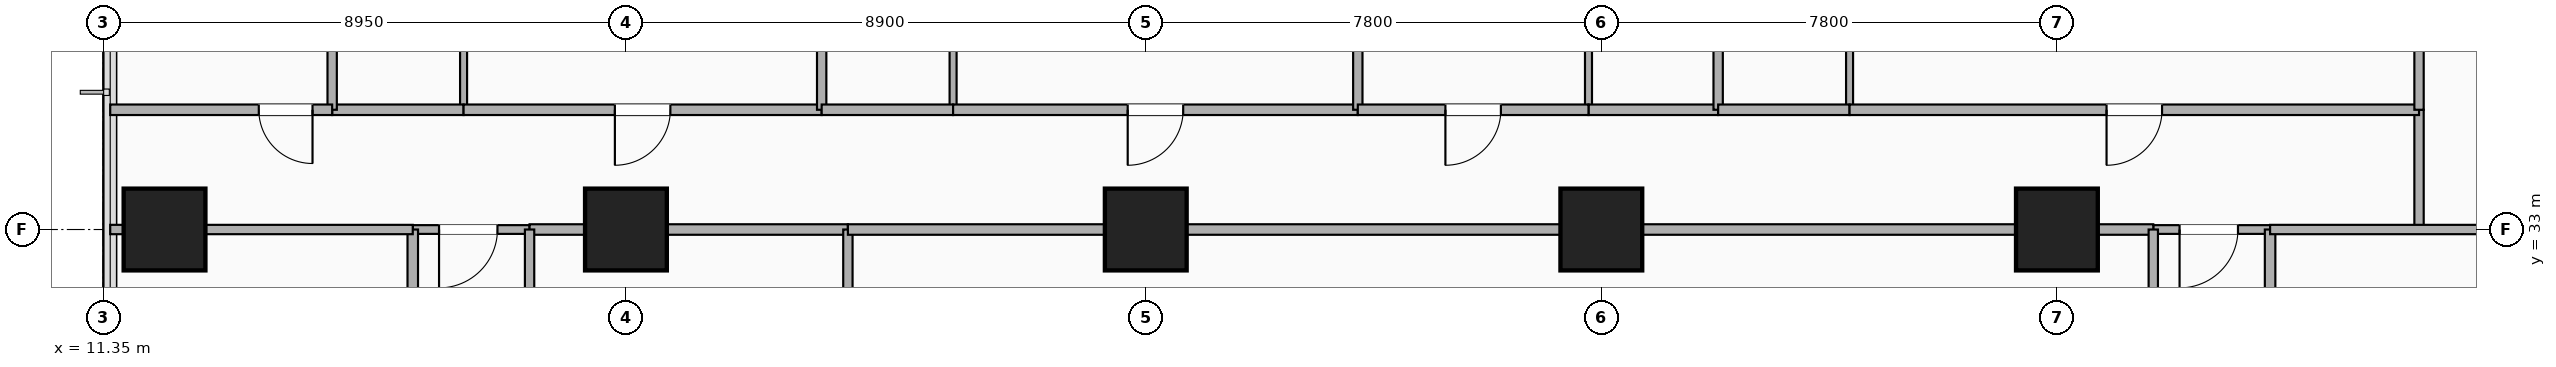
"""IFC4 building model, lengths in metres.
Left out: names, types, materials, properties, quantities, classifications, styles, units other than length and angle.
Written with IfcOpenShell. Run it as: python <this file> out.ifc"""

import sys

from ifc_helpers import new_model, si_unit, direction, frame, frame_2d, origin, origin_2d, place, context, subcontext, project, spatial, rectangle, extrude, element, fill, save


model = new_model("IFC4")
c1 = context("Model", 3, precision=1e-05, world=origin(), true_north=direction((0.0, 1.0)))
c2 = subcontext(c1, "Body", "Model", "MODEL_VIEW")
j1 = project(units=[si_unit("LENGTHUNIT", "METRE"), si_unit("PLANEANGLEUNIT", "RADIAN")], contexts=[c1])
p1 = place(None, origin())
s1 = spatial("IfcSite", under=j1, at=p1, CompositionType="ELEMENT")
p2 = place(p1, origin())
s2 = spatial("IfcBuilding", under=s1, at=p2, CompositionType="ELEMENT")
p3 = place(p2, frame((0.0, 0.0, 64.9)))
s3 = spatial("IfcBuildingStorey", under=s2, at=p3, CompositionType="ELEMENT", Elevation=64.9)
for number, where, z_axis, x_axis in (
    (1, (20.3, 33.0, -0.28), (0.0, 0.0, 1.0), (1.0, 0.0, 0.0)),
    (2, (29.2, 33.0, -0.28), (0.0, 0.0, 1.0), (1.0, 0.0, 0.0)),
    (3, (37.0, 33.0, -0.28), (0.0, 0.0, 1.0), (1.0, 0.0, 0.0)),
    (4, (44.8, 33.0, -0.28), (0.0, 0.0, 1.0), (1.0, 0.0, 0.0)),
    (5, (12.4, 33.0, -0.28), (0.0, 0.0, 1.0), (1.0, 0.0, 0.0)),
):
    element("IfcColumn", number, at=place(p3, frame(where, z_axis=z_axis, x_axis=x_axis)), inside=s3, PredefinedType="COLUMN", context=c2, shape_type="SweptSolid", body=[
        extrude(rectangle(XDim=1.4, YDim=1.4, at=origin_2d()), origin(), (0.0, 0.0, 1.0), 3.5),
    ])
p4 = place(p3, frame((16.65, 33.0, 0.0), z_axis=(0.0, 0.0, 1.0), x_axis=(1.0, 0.0, 0.0)))
e6 = element("IfcWall", 6, at=p4, inside=s3, PredefinedType="PARTITIONING", context=c2, shape_type="SweptSolid", body=[
    extrude(rectangle(XDim=2.0, YDim=0.15, at=frame_2d((1.0, 0.0))), origin(), (0.0, 0.0, 1.0), 2.51),
])
p5 = place(p4, frame((0.45, 0.0, 0.0)))
e7 = element("IfcOpeningElement", 7, at=p5, cuts=e6, PredefinedType="OPENING", context=c2, shape_type="SweptSolid", body=[
    extrude(rectangle(XDim=1.0, YDim=2.15, at=frame_2d((0.5, 1.075))), frame((0.0, 0.085, 0.0), z_axis=(0.0, -1.0, 0.0), x_axis=(1.0, 0.0, 0.0)), (0.0, 0.0, 1.0), 0.17),
])
p6 = place(p3, frame((46.45, 33.0, 0.0), z_axis=(0.0, 0.0, 1.0), x_axis=(1.0, 0.0, 0.0)))
e8 = element("IfcWall", 8, at=p6, inside=s3, PredefinedType="PARTITIONING", context=c2, shape_type="SweptSolid", body=[
    extrude(rectangle(XDim=2.0, YDim=0.15, at=frame_2d((1.0, 0.0))), origin(), (0.0, 0.0, 1.0), 2.51),
])
p7 = place(p6, frame((0.45, 0.0, 0.0)))
e9 = element("IfcOpeningElement", 9, at=p7, cuts=e8, PredefinedType="OPENING", context=c2, shape_type="SweptSolid", body=[
    extrude(rectangle(XDim=1.0, YDim=2.15, at=frame_2d((0.5, 1.075))), frame((0.0, 0.085, 0.0), z_axis=(0.0, -1.0, 0.0), x_axis=(1.0, 0.0, 0.0)), (0.0, 0.0, 1.0), 0.17),
])
p8 = place(p3, frame((51.0, 33.0, 0.0), z_axis=(0.0, 0.0, 1.0), x_axis=(0.0, 1.0, 0.0)))
e10 = element("IfcWall", 10, at=p8, inside=s3, PredefinedType="PARTITIONING", context=c2, shape_type="SweptSolid", body=[
    extrude(rectangle(XDim=2.05, YDim=0.16, at=frame_2d((1.025, 0.0))), origin(), (0.0, 0.0, 1.0), 2.51),
])
p9 = place(p3, frame((18.65, 33.0, 0.0), z_axis=(0.0, 0.0, 1.0), x_axis=(1.0, 0.0, 0.0)))
e11 = element("IfcWall", 11, at=p9, inside=s3, PredefinedType="PARTITIONING", context=c2, shape_type="SweptSolid", body=[
    extrude(rectangle(XDim=5.45, YDim=0.18, at=frame_2d((2.725, 0.0))), origin(), (0.0, 0.0, 1.0), 2.51),
])
for number, where, z_axis, x_axis in (
    (12, (18.65, 22.65, 0.0), (0.0, 0.0, 1.0), (0.0, 1.0, 0.0)),
    (13, (24.1, 22.65, 0.0), (0.0, 0.0, 1.0), (0.0, 1.0, 0.0)),
):
    element("IfcWall", number, at=place(p3, frame(where, z_axis=z_axis, x_axis=x_axis)), inside=s3, PredefinedType="PARTITIONING", context=c2, shape_type="SweptSolid", body=[
        extrude(rectangle(XDim=10.35, YDim=0.16, at=frame_2d((5.175, 0.0))), origin(), (0.0, 0.0, 1.0), 2.51),
    ])
p10 = place(p3, frame((24.1, 33.0, 0.0), z_axis=(0.0, 0.0, 1.0), x_axis=(1.0, 0.0, 0.0)))
e14 = element("IfcWall", 14, at=p10, inside=s3, PredefinedType="PARTITIONING", context=c2, shape_type="SweptSolid", body=[
    extrude(rectangle(XDim=22.35, YDim=0.18, at=frame_2d((11.175, 0.0))), origin(), (0.0, 0.0, 1.0), 2.51),
])
p11 = place(p3, frame((46.45, 22.65, 0.0), z_axis=(0.0, 0.0, 1.0), x_axis=(0.0, 1.0, 0.0)))
e15 = element("IfcWall", 15, at=p11, inside=s3, PredefinedType="PARTITIONING", context=c2, shape_type="SweptSolid", body=[
    extrude(rectangle(XDim=10.35, YDim=0.16, at=frame_2d((5.175, 0.0))), origin(), (0.0, 0.0, 1.0), 2.51),
])
p12 = place(p3, frame((17.52, 35.05, 0.0), z_axis=(0.0, 0.0, 1.0), x_axis=(0.0, 1.0, 0.0)))
e16 = element("IfcWall", 16, at=p12, inside=s3, PredefinedType="PARTITIONING", context=c2, shape_type="SweptSolid", body=[
    extrude(rectangle(XDim=2.35, YDim=0.12, at=frame_2d((1.175, 0.0))), origin(), (0.0, 0.0, 1.0), 3.22),
])
p13 = place(p3, frame((15.27, 35.05, 0.0), z_axis=(0.0, 0.0, 1.0), x_axis=(1.0, 0.0, 0.0)))
e17 = element("IfcWall", 17, at=p13, inside=s3, PredefinedType="PARTITIONING", context=c2, shape_type="SweptSolid", body=[
    extrude(rectangle(XDim=2.25, YDim=0.18, at=frame_2d((1.125, 0.0))), origin(), (0.0, 0.0, 1.0), 3.22),
])
p14 = place(p3, frame((17.52, 35.05, 0.0), z_axis=(0.0, 0.0, 1.0), x_axis=(1.0, 0.0, 0.0)))
e18 = element("IfcWall", 18, at=p14, inside=s3, PredefinedType="PARTITIONING", context=c2, shape_type="SweptSolid", body=[
    extrude(rectangle(XDim=6.131, YDim=0.18, at=frame_2d((3.065, 0.0))), origin(), (0.0, 0.0, 1.0), 2.51),
])
p15 = place(p14, frame((2.591, 0.0, 0.0)))
e19 = element("IfcOpeningElement", 19, at=p15, cuts=e18, PredefinedType="OPENING", context=c2, shape_type="SweptSolid", body=[
    extrude(rectangle(XDim=0.95, YDim=2.15, at=frame_2d((0.475, 1.075))), frame((0.0, 0.1, 0.0), z_axis=(0.0, -1.0, 0.0), x_axis=(1.0, 0.0, 0.0)), (0.0, 0.0, 1.0), 0.2),
])
p16 = place(p3, frame((15.27, 35.05, 0.0), z_axis=(0.0, 0.0, 1.0), x_axis=(0.0, 1.0, 0.0)))
e20 = element("IfcWall", 20, at=p16, inside=s3, PredefinedType="PARTITIONING", context=c2, shape_type="SweptSolid", body=[
    extrude(rectangle(XDim=9.53, YDim=0.16, at=frame_2d((4.765, 0.0))), origin(), (0.0, 0.0, 1.0), 3.22),
])
p17 = place(p3, frame((23.651, 35.05, 0.0), z_axis=(0.0, 0.0, 1.0), x_axis=(0.0, 1.0, 0.0)))
e21 = element("IfcWall", 21, at=p17, inside=s3, PredefinedType="PARTITIONING", context=c2, shape_type="SweptSolid", body=[
    extrude(rectangle(XDim=13.33, YDim=0.16, at=frame_2d((6.665, 0.0))), origin(), (0.0, 0.0, 1.0), 2.583),
])
p18 = place(p3, frame((25.901, 35.05, 0.0), z_axis=(0.0, 0.0, 1.0), x_axis=(0.0, 1.0, 0.0)))
e22 = element("IfcWall", 22, at=p18, inside=s3, PredefinedType="PARTITIONING", context=c2, shape_type="SweptSolid", body=[
    extrude(rectangle(XDim=2.35, YDim=0.12, at=frame_2d((1.175, 0.0))), origin(), (0.0, 0.0, 1.0), 2.902),
])
p19 = place(p3, frame((23.651, 35.05, 0.0), z_axis=(0.0, 0.0, 1.0), x_axis=(1.0, 0.0, 0.0)))
e23 = element("IfcWall", 23, at=p19, inside=s3, PredefinedType="PARTITIONING", context=c2, shape_type="SweptSolid", body=[
    extrude(rectangle(XDim=2.25, YDim=0.18, at=frame_2d((1.125, 0.0))), origin(), (0.0, 0.0, 1.0), 3.22),
])
p20 = place(p3, frame((25.901, 35.05, 0.0), z_axis=(0.0, 0.0, 1.0), x_axis=(1.0, 0.0, 0.0)))
e24 = element("IfcWall", 24, at=p20, inside=s3, PredefinedType="PARTITIONING", context=c2, shape_type="SweptSolid", body=[
    extrude(rectangle(XDim=6.929, YDim=0.18, at=frame_2d((3.465, 0.0))), origin(), (0.0, 0.0, 1.0), 2.51),
])
p21 = place(p20, frame((2.99, 0.0, 0.0)))
e25 = element("IfcOpeningElement", 25, at=p21, cuts=e24, PredefinedType="OPENING", context=c2, shape_type="SweptSolid", body=[
    extrude(rectangle(XDim=0.95, YDim=2.15, at=frame_2d((0.475, 1.075))), frame((0.0, 0.1, 0.0), z_axis=(0.0, -1.0, 0.0), x_axis=(1.0, 0.0, 0.0)), (0.0, 0.0, 1.0), 0.2),
])
p22 = place(p3, frame((32.83, 35.05, 0.0), z_axis=(0.0, 0.0, 1.0), x_axis=(0.0, 1.0, 0.0)))
e26 = element("IfcWall", 26, at=p22, inside=s3, PredefinedType="PARTITIONING", context=c2, shape_type="SweptSolid", body=[
    extrude(rectangle(XDim=13.33, YDim=0.16, at=frame_2d((6.665, 0.0))), origin(), (0.0, 0.0, 1.0), 2.583),
])
p23 = place(p3, frame((36.78, 35.05, 0.0), z_axis=(0.0, 0.0, 1.0), x_axis=(0.0, 1.0, 0.0)))
e27 = element("IfcWall", 27, at=p23, inside=s3, PredefinedType="PARTITIONING", context=c2, shape_type="SweptSolid", body=[
    extrude(rectangle(XDim=2.35, YDim=0.12, at=frame_2d((1.175, 0.0))), origin(), (0.0, 0.0, 1.0), 2.51),
])
p24 = place(p3, frame((36.78, 35.05, 0.0), z_axis=(0.0, 0.0, 1.0), x_axis=(1.0, 0.0, 0.0)))
e28 = element("IfcWall", 28, at=p24, inside=s3, PredefinedType="PARTITIONING", context=c2, shape_type="SweptSolid", body=[
    extrude(rectangle(XDim=2.22, YDim=0.18, at=frame_2d((1.11, 0.0))), origin(), (0.0, 0.0, 1.0), 2.51),
])
p25 = place(p3, frame((32.83, 35.05, 0.0), z_axis=(0.0, 0.0, 1.0), x_axis=(1.0, 0.0, 0.0)))
e29 = element("IfcWall", 29, at=p25, inside=s3, PredefinedType="PARTITIONING", context=c2, shape_type="SweptSolid", body=[
    extrude(rectangle(XDim=3.95, YDim=0.18, at=frame_2d((1.975, 0.0))), origin(), (0.0, 0.0, 1.0), 2.51),
])
p26 = place(p25, frame((1.5, 0.0, 0.0)))
e30 = element("IfcOpeningElement", 30, at=p26, cuts=e29, PredefinedType="OPENING", context=c2, shape_type="SweptSolid", body=[
    extrude(rectangle(XDim=0.95, YDim=2.15, at=frame_2d((0.475, 1.075))), frame((0.0, 0.1, 0.0), z_axis=(0.0, -1.0, 0.0), x_axis=(1.0, 0.0, 0.0)), (0.0, 0.0, 1.0), 0.2),
])
p27 = place(p3, frame((39.0, 35.05, 0.0), z_axis=(0.0, 0.0, 1.0), x_axis=(0.0, 1.0, 0.0)))
e31 = element("IfcWall", 31, at=p27, inside=s3, PredefinedType="PARTITIONING", context=c2, shape_type="SweptSolid", body=[
    extrude(rectangle(XDim=13.33, YDim=0.16, at=frame_2d((6.665, 0.0))), origin(), (0.0, 0.0, 1.0), 2.583),
])
p28 = place(p3, frame((41.25, 35.05, 0.0), z_axis=(0.0, 0.0, 1.0), x_axis=(0.0, 1.0, 0.0)))
e32 = element("IfcWall", 32, at=p28, inside=s3, PredefinedType="PARTITIONING", context=c2, shape_type="SweptSolid", body=[
    extrude(rectangle(XDim=2.35, YDim=0.12, at=frame_2d((1.175, 0.0))), origin(), (0.0, 0.0, 1.0), 2.902),
])
p29 = place(p3, frame((39.0, 35.05, 0.0), z_axis=(0.0, 0.0, 1.0), x_axis=(1.0, 0.0, 0.0)))
e33 = element("IfcWall", 33, at=p29, inside=s3, PredefinedType="PARTITIONING", context=c2, shape_type="SweptSolid", body=[
    extrude(rectangle(XDim=2.25, YDim=0.18, at=frame_2d((1.125, 0.0))), origin(), (0.0, 0.0, 1.0), 3.22),
])
p30 = place(p3, frame((41.25, 35.05, 0.0), z_axis=(0.0, 0.0, 1.0), x_axis=(1.0, 0.0, 0.0)))
e34 = element("IfcWall", 34, at=p30, inside=s3, PredefinedType="PARTITIONING", context=c2, shape_type="SweptSolid", body=[
    extrude(rectangle(XDim=9.75, YDim=0.18, at=frame_2d((4.875, 0.0))), origin(), (0.0, 0.0, 1.0), 2.51),
])
p31 = place(p30, frame((4.4, 0.0, 0.0)))
e35 = element("IfcOpeningElement", 35, at=p31, cuts=e34, PredefinedType="OPENING", context=c2, shape_type="SweptSolid", body=[
    extrude(rectangle(XDim=0.95, YDim=2.15, at=frame_2d((0.475, 1.075))), frame((0.0, 0.1, 0.0), z_axis=(0.0, -1.0, 0.0), x_axis=(1.0, 0.0, 0.0)), (0.0, 0.0, 1.0), 0.2),
])
p32 = place(p3, frame((51.0, 35.05, 0.0), z_axis=(0.0, 0.0, 1.0), x_axis=(0.0, 1.0, 0.0)))
e36 = element("IfcWall", 36, at=p32, inside=s3, PredefinedType="PARTITIONING", context=c2, shape_type="SweptSolid", body=[
    extrude(rectangle(XDim=13.33, YDim=0.16, at=frame_2d((6.665, 0.0))), origin(), (0.0, 0.0, 1.0), 3.22),
])
p33 = place(p3, frame((16.65, 28.183, 0.0), z_axis=(0.0, 0.0, 1.0), x_axis=(0.0, 1.0, 0.0)))
e37 = element("IfcWall", 37, at=p33, inside=s3, PredefinedType="PARTITIONING", context=c2, shape_type="SweptSolid", body=[
    extrude(rectangle(XDim=4.817, YDim=0.18, at=frame_2d((2.408, 0.0))), origin(), (0.0, 0.0, 1.0), 2.51),
])
p34 = place(p33, frame((1.933, 0.0, 0.0)))
e38 = element("IfcOpeningElement", 38, at=p34, cuts=e37, PredefinedType="OPENING", context=c2, shape_type="SweptSolid", body=[
    extrude(rectangle(XDim=0.95, YDim=2.15, at=frame_2d((0.475, 1.075))), frame((0.0, 0.1, 0.0), z_axis=(0.0, -1.0, 0.0), x_axis=(1.0, 0.0, 0.0)), (0.0, 0.0, 1.0), 0.2),
])
p35 = place(p3, frame((11.47, 33.0, 0.0), z_axis=(0.0, 0.0, 1.0), x_axis=(1.0, 0.0, 0.0)))
e39 = element("IfcWall", 39, at=p35, inside=s3, PredefinedType="PARTITIONING", context=c2, shape_type="SweptSolid", body=[
    extrude(rectangle(XDim=5.18, YDim=0.16, at=frame_2d((2.59, 0.0))), origin(), (0.0, 0.0, 1.0), 2.51),
])
p36 = place(p3, frame((48.45, 28.55, 0.0), z_axis=(0.0, 0.0, 1.0), x_axis=(0.0, 1.0, 0.0)))
e40 = element("IfcWall", 40, at=p36, inside=s3, PredefinedType="PARTITIONING", context=c2, shape_type="SweptSolid", body=[
    extrude(rectangle(XDim=4.45, YDim=0.18, at=frame_2d((2.225, 0.0))), origin(), (0.0, 0.0, 1.0), 2.51),
])
p37 = place(p36, frame((2.7, 0.0, 0.0), z_axis=(0.0, 0.0, 1.0), x_axis=(-1.0, 0.0, 0.0)))
e41 = element("IfcOpeningElement", 41, at=p37, cuts=e40, PredefinedType="OPENING", context=c2, shape_type="SweptSolid", body=[
    extrude(rectangle(XDim=0.95, YDim=2.15, at=frame_2d((0.475, 1.075))), frame((0.0, 0.1, 0.0), z_axis=(0.0, -1.0, 0.0), x_axis=(1.0, 0.0, 0.0)), (0.0, 0.0, 1.0), 0.2),
])
p38 = place(p3, frame((48.45, 33.0, 0.0), z_axis=(0.0, 0.0, 1.0), x_axis=(1.0, 0.0, 0.0)))
e42 = element("IfcWall", 42, at=p38, inside=s3, PredefinedType="PARTITIONING", context=c2, shape_type="SweptSolid", body=[
    extrude(rectangle(XDim=13.23, YDim=0.16, at=frame_2d((6.615, 0.0))), origin(), (0.0, 0.0, 1.0), 2.51),
])
p39 = place(p3, frame((11.47, 35.05, 0.0), z_axis=(0.0, 0.0, 1.0), x_axis=(1.0, 0.0, 0.0)))
e43 = element("IfcWall", 43, at=p39, inside=s3, PredefinedType="PARTITIONING", context=c2, shape_type="SweptSolid", body=[
    extrude(rectangle(XDim=3.8, YDim=0.18, at=frame_2d((1.9, 0.0))), origin(), (0.0, 0.0, 1.0), 3.22),
])
p40 = place(p39, frame((2.544, 0.0, 0.0)))
e44 = element("IfcOpeningElement", 44, at=p40, cuts=e43, PredefinedType="OPENING", context=c2, shape_type="SweptSolid", body=[
    extrude(rectangle(XDim=0.92, YDim=2.08, at=frame_2d((0.46, 1.04))), frame((0.0, 0.1, 0.0), z_axis=(0.0, -1.0, 0.0), x_axis=(1.0, 0.0, 0.0)), (0.0, 0.0, 1.0), 0.2),
])
p41 = place(p5, origin())
e45 = element("IfcDoor", 45, at=p41, inside=s3, OperationType="SINGLE_SWING_LEFT", PredefinedType="DOOR", context=c2, shape_type="SweptSolid", body=[
    extrude(rectangle(XDim=1.0, YDim=2.15, at=frame_2d((0.5, 1.075))), frame((0.0, 0.025, 0.0), z_axis=(0.0, -1.0, 0.0), x_axis=(1.0, 0.0, 0.0)), (0.0, 0.0, 1.0), 0.05),
])
fill(e7, e45)
p42 = place(p7, origin())
e46 = element("IfcDoor", 46, at=p42, inside=s3, OperationType="SINGLE_SWING_LEFT", PredefinedType="DOOR", context=c2, shape_type="SweptSolid", body=[
    extrude(rectangle(XDim=1.0, YDim=2.15, at=frame_2d((0.5, 1.075))), frame((0.0, 0.025, 0.0), z_axis=(0.0, -1.0, 0.0), x_axis=(1.0, 0.0, 0.0)), (0.0, 0.0, 1.0), 0.05),
])
fill(e9, e46)
p43 = place(p15, origin())
e47 = element("IfcDoor", 47, at=p43, inside=s3, OperationType="SINGLE_SWING_LEFT", PredefinedType="DOOR", context=c2, shape_type="SweptSolid", body=[
    extrude(rectangle(XDim=0.95, YDim=2.15, at=frame_2d((0.475, 1.075))), frame((0.0, 0.025, 0.0), z_axis=(0.0, -1.0, 0.0), x_axis=(1.0, 0.0, 0.0)), (0.0, 0.0, 1.0), 0.05),
])
fill(e19, e47)
p44 = place(p21, origin())
e48 = element("IfcDoor", 48, at=p44, inside=s3, OperationType="SINGLE_SWING_LEFT", PredefinedType="DOOR", context=c2, shape_type="SweptSolid", body=[
    extrude(rectangle(XDim=0.95, YDim=2.15, at=frame_2d((0.475, 1.075))), frame((0.0, 0.025, 0.0), z_axis=(0.0, -1.0, 0.0), x_axis=(1.0, 0.0, 0.0)), (0.0, 0.0, 1.0), 0.05),
])
fill(e25, e48)
p45 = place(p26, origin())
e49 = element("IfcDoor", 49, at=p45, inside=s3, OperationType="SINGLE_SWING_LEFT", PredefinedType="DOOR", context=c2, shape_type="SweptSolid", body=[
    extrude(rectangle(XDim=0.95, YDim=2.15, at=frame_2d((0.475, 1.075))), frame((0.0, 0.025, 0.0), z_axis=(0.0, -1.0, 0.0), x_axis=(1.0, 0.0, 0.0)), (0.0, 0.0, 1.0), 0.05),
])
fill(e30, e49)
p46 = place(p31, origin())
e50 = element("IfcDoor", 50, at=p46, inside=s3, OperationType="SINGLE_SWING_LEFT", PredefinedType="DOOR", context=c2, shape_type="SweptSolid", body=[
    extrude(rectangle(XDim=0.95, YDim=2.15, at=frame_2d((0.475, 1.075))), frame((0.0, 0.025, 0.0), z_axis=(0.0, -1.0, 0.0), x_axis=(1.0, 0.0, 0.0)), (0.0, 0.0, 1.0), 0.05),
])
fill(e35, e50)
p47 = place(p40, origin())
e51 = element("IfcDoor", 51, at=p47, inside=s3, OperationType="SINGLE_SWING_RIGHT", PredefinedType="DOOR", context=c2, shape_type="SweptSolid", body=[
    extrude(rectangle(XDim=0.92, YDim=2.08, at=frame_2d((0.46, 1.04))), frame((0.0, 0.025, 0.0), z_axis=(0.0, -1.0, 0.0), x_axis=(1.0, 0.0, 0.0)), (0.0, 0.0, 1.0), 0.05),
])
fill(e44, e51)
save(model, sys.argv[1])
